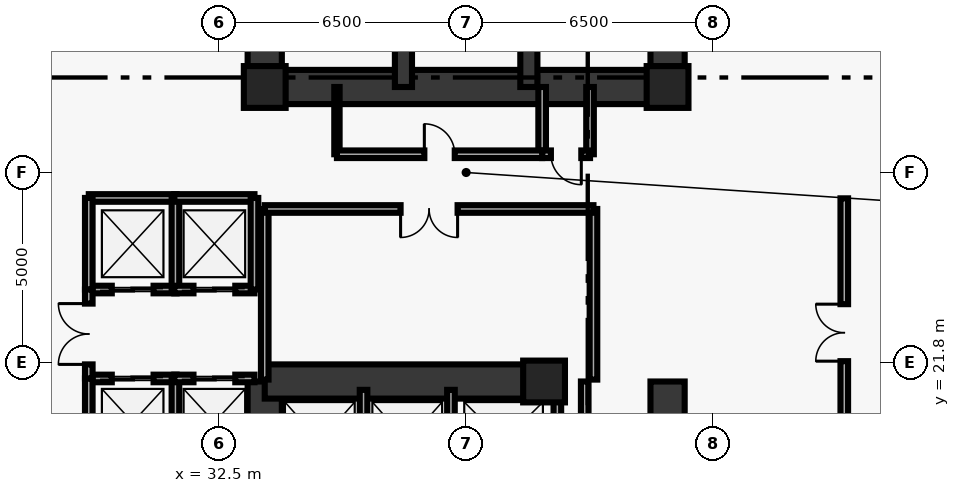
"""IFC4 building model, lengths in metres.
Left out: names, types, materials, properties, quantities, classifications, styles, units other than length and angle.
Written with IfcOpenShell. Run it as: python <this file> out.ifc"""

import sys

from ifc_helpers import new_model, si_unit, direction, frame, frame_2d, origin, origin_2d, place, context, subcontext, project, spatial, rectangle, extrude, element, fill, save


model = new_model("IFC4")
c1 = context("Model", 3, precision=1e-05, world=origin(), true_north=direction((0.0, 1.0)))
c2 = subcontext(c1, "Body", "Model", "MODEL_VIEW")
j1 = project(units=[si_unit("LENGTHUNIT", "METRE"), si_unit("PLANEANGLEUNIT", "RADIAN")], contexts=[c1])
p1 = place(None, origin())
s1 = spatial("IfcSite", under=j1, at=p1, CompositionType="ELEMENT")
p2 = place(p1, origin())
s2 = spatial("IfcBuilding", under=s1, at=p2, CompositionType="ELEMENT")
p3 = place(p2, frame((0.0, 0.0, -9.0)))
s3 = spatial("IfcBuildingStorey", under=s2, at=p3, CompositionType="ELEMENT", Elevation=-9.0)
for number, where, z_axis, x_axis in (
    (1, (41.05, 21.3, 0.0), (0.0, 0.0, 1.0), (1.0, 0.0, 0.0)),
    (2, (44.3, 29.05, 0.0), (0.0, 0.0, 1.0), (1.0, 0.0, 0.0)),
    (3, (33.7, 29.05, 0.0), (0.0, 0.0, 1.0), (1.0, 0.0, 0.0)),
):
    element("IfcColumn", number, at=place(p3, frame(where, z_axis=z_axis, x_axis=x_axis)), inside=s3, PredefinedType="PILASTER", context=c2, shape_type="SweptSolid", body=[
        extrude(rectangle(XDim=1.1, YDim=1.1, at=origin_2d()), origin(), (0.0, 0.0, 1.0), 4.2),
    ])
p4 = place(p3, frame((33.7, 29.05, 0.0), z_axis=(0.0, 0.0, 1.0), x_axis=(0.0, 1.0, 0.0)))
e4 = element("IfcWall", 4, at=p4, inside=s3, PredefinedType="SHEAR", context=c2, shape_type="SweptSolid", body=[
    extrude(rectangle(XDim=8.35, YDim=0.9, at=frame_2d((4.175, 0.0))), origin(), (0.0, 0.0, 1.0), 4.2),
])
p5 = place(p3, frame((33.7, 18.35, 0.0), z_axis=(0.0, 0.0, 1.0), x_axis=(0.0, 1.0, 0.0)))
e5 = element("IfcWall", 5, at=p5, inside=s3, PredefinedType="SHEAR", context=c2, shape_type="SweptSolid", body=[
    extrude(rectangle(XDim=2.95, YDim=0.9, at=frame_2d((1.475, 0.0))), origin(), (0.0, 0.0, 1.0), 4.2),
])
p6 = place(p3, frame((44.3, 29.05, 0.0), z_axis=(0.0, 0.0, 1.0), x_axis=(0.0, 1.0, 0.0)))
e6 = element("IfcWall", 6, at=p6, inside=s3, PredefinedType="SHEAR", context=c2, shape_type="SweptSolid", body=[
    extrude(rectangle(XDim=8.35, YDim=0.9, at=frame_2d((4.175, 0.0))), origin(), (0.0, 0.0, 1.0), 4.2),
])
p7 = place(p3, frame((44.3, 18.35, 0.0), z_axis=(0.0, 0.0, 1.0), x_axis=(0.0, 1.0, 0.0)))
e7 = element("IfcWall", 7, at=p7, inside=s3, PredefinedType="SHEAR", context=c2, shape_type="SweptSolid", body=[
    extrude(rectangle(XDim=2.95, YDim=0.9, at=frame_2d((1.475, 0.0))), origin(), (0.0, 0.0, 1.0), 4.2),
])
p8 = place(p3, frame((33.7, 29.05, 0.0), z_axis=(0.0, 0.0, 1.0), x_axis=(1.0, 0.0, 0.0)))
e8 = element("IfcWall", 8, at=p8, inside=s3, PredefinedType="SHEAR", context=c2, shape_type="SweptSolid", body=[
    extrude(rectangle(XDim=10.6, YDim=0.9, at=frame_2d((5.3, 0.0))), origin(), (0.0, 0.0, 1.0), 4.2),
])
p9 = place(p3, frame((33.7, 21.3, 0.0), z_axis=(0.0, 0.0, 1.0), x_axis=(1.0, 0.0, 0.0)))
e9 = element("IfcWall", 9, at=p9, inside=s3, PredefinedType="SHEAR", context=c2, shape_type="SweptSolid", body=[
    extrude(rectangle(XDim=7.55, YDim=0.9, at=frame_2d((3.775, 0.0))), origin(), (0.0, 0.0, 1.0), 4.2),
])
for number, where, z_axis, x_axis in (
    (10, (37.35, 29.05, 0.0), (0.0, 0.0, 1.0), (0.0, 1.0, 0.0)),
    (11, (40.65, 29.05, 0.0), (0.0, 0.0, 1.0), (0.0, 1.0, 0.0)),
):
    element("IfcWall", number, at=place(p3, frame(where, z_axis=z_axis, x_axis=x_axis)), inside=s3, PredefinedType="SHEAR", context=c2, shape_type="SweptSolid", body=[
        extrude(rectangle(XDim=8.35, YDim=0.45, at=frame_2d((4.175, 0.0))), origin(), (0.0, 0.0, 1.0), 4.2),
    ])
p10 = place(p3, frame((35.6, 27.28, 0.0), z_axis=(0.0, 0.0, 1.0), x_axis=(0.0, 1.0, 0.0)))
e12 = element("IfcWall", 12, at=p10, inside=s3, PredefinedType="PARTITIONING", context=c2, shape_type="SweptSolid", body=[
    extrude(rectangle(XDim=1.77, YDim=0.14, at=frame_2d((0.885, 0.0))), origin(), (0.0, 0.0, 1.0), 4.2),
])
for number, where, z_axis, x_axis in (
    (13, (41.0, 27.28, 0.0), (0.0, 0.0, 1.0), (0.0, 1.0, 0.0)),
    (14, (42.26, 27.28, 0.0), (0.0, 0.0, 1.0), (0.0, 1.0, 0.0)),
):
    element("IfcWall", number, at=place(p3, frame(where, z_axis=z_axis, x_axis=x_axis)), inside=s3, PredefinedType="SOLIDWALL", context=c2, shape_type="SweptSolid", body=[
        extrude(rectangle(XDim=1.77, YDim=0.2, at=frame_2d((0.885, 0.0))), origin(), (0.0, 0.0, 1.0), 4.2),
    ])
p11 = place(p3, frame((41.0, 27.28, 0.0), z_axis=(0.0, 0.0, 1.0), x_axis=(1.0, 0.0, 0.0)))
e15 = element("IfcWall", 15, at=p11, inside=s3, PredefinedType="SOLIDWALL", context=c2, shape_type="SweptSolid", body=[
    extrude(rectangle(XDim=1.26, YDim=0.2, at=frame_2d((0.63, 0.0))), origin(), (0.0, 0.0, 1.0), 4.2),
])
p12 = place(p11, frame((0.23, 0.0, 0.0)))
e16 = element("IfcOpeningElement", 16, at=p12, cuts=e15, PredefinedType="OPENING", context=c2, shape_type="SweptSolid", body=[
    extrude(rectangle(XDim=0.8, YDim=2.05, at=frame_2d((0.4, 1.025))), frame((0.0, 0.11, 0.0), z_axis=(0.0, -1.0, 0.0), x_axis=(1.0, 0.0, 0.0)), (0.0, 0.0, 1.0), 0.22),
])
p13 = place(p3, frame((29.07, 23.72, 0.0), z_axis=(0.0, 0.0, 1.0), x_axis=(1.0, 0.0, 0.0)))
e17 = element("IfcWall", 17, at=p13, inside=s3, PredefinedType="SOLIDWALL", context=c2, shape_type="SweptSolid", body=[
    extrude(rectangle(XDim=2.31, YDim=0.2, at=frame_2d((1.155, 0.0))), origin(), (0.0, 0.0, 1.0), 4.2),
])
p14 = place(p13, frame((0.605, 0.0, 0.0)))
e18 = element("IfcOpeningElement", 18, at=p14, cuts=e17, PredefinedType="OPENING", context=c2, shape_type="SweptSolid", body=[
    extrude(rectangle(XDim=1.1, YDim=2.15, at=frame_2d((0.55, 1.075))), frame((0.0, 0.11, 0.0), z_axis=(0.0, -1.0, 0.0), x_axis=(1.0, 0.0, 0.0)), (0.0, 0.0, 1.0), 0.22),
])
p15 = place(p3, frame((29.07, 26.13, 0.0), z_axis=(0.0, 0.0, 1.0), x_axis=(1.0, 0.0, 0.0)))
e19 = element("IfcWall", 19, at=p15, inside=s3, PredefinedType="SOLIDWALL", context=c2, shape_type="SweptSolid", body=[
    extrude(rectangle(XDim=2.31, YDim=0.2, at=frame_2d((1.155, 0.0))), origin(), (0.0, 0.0, 1.0), 4.2),
])
for number, where, z_axis, x_axis in (
    (20, (29.07, 23.72, 0.0), (0.0, 0.0, 1.0), (0.0, 1.0, 0.0)),
    (21, (31.35, 23.72, 0.0), (0.0, 0.0, 1.0), (0.0, 1.0, 0.0)),
):
    element("IfcWall", number, at=place(p3, frame(where, z_axis=z_axis, x_axis=x_axis)), inside=s3, PredefinedType="SOLIDWALL", context=c2, shape_type="SweptSolid", body=[
        extrude(rectangle(XDim=2.41, YDim=0.2, at=frame_2d((1.205, 0.0))), origin(), (0.0, 0.0, 1.0), 4.2),
    ])
p16 = place(p3, frame((31.32, 23.72, 0.0), z_axis=(0.0, 0.0, 1.0), x_axis=(1.0, 0.0, 0.0)))
e22 = element("IfcWall", 22, at=p16, inside=s3, PredefinedType="SOLIDWALL", context=c2, shape_type="SweptSolid", body=[
    extrude(rectangle(XDim=2.11, YDim=0.2, at=frame_2d((1.055, 0.0))), origin(), (0.0, 0.0, 1.0), 4.2),
])
p17 = place(p16, frame((0.505, 0.0, 0.0)))
e23 = element("IfcOpeningElement", 23, at=p17, cuts=e22, PredefinedType="OPENING", context=c2, shape_type="SweptSolid", body=[
    extrude(rectangle(XDim=1.1, YDim=2.15, at=frame_2d((0.55, 1.075))), frame((0.0, 0.11, 0.0), z_axis=(0.0, -1.0, 0.0), x_axis=(1.0, 0.0, 0.0)), (0.0, 0.0, 1.0), 0.22),
])
p18 = place(p3, frame((31.32, 26.13, 0.0), z_axis=(0.0, 0.0, 1.0), x_axis=(1.0, 0.0, 0.0)))
e24 = element("IfcWall", 24, at=p18, inside=s3, PredefinedType="SOLIDWALL", context=c2, shape_type="SweptSolid", body=[
    extrude(rectangle(XDim=2.11, YDim=0.2, at=frame_2d((1.055, 0.0))), origin(), (0.0, 0.0, 1.0), 4.2),
])
p19 = place(p3, frame((33.43, 23.72, 0.0), z_axis=(0.0, 0.0, 1.0), x_axis=(0.0, 1.0, 0.0)))
e25 = element("IfcWall", 25, at=p19, inside=s3, PredefinedType="SOLIDWALL", context=c2, shape_type="SweptSolid", body=[
    extrude(rectangle(XDim=2.41, YDim=0.2, at=frame_2d((1.205, 0.0))), origin(), (0.0, 0.0, 1.0), 4.2),
])
p20 = place(p3, frame((29.07, 21.38, 0.0), z_axis=(0.0, 0.0, 1.0), x_axis=(1.0, 0.0, 0.0)))
e26 = element("IfcWall", 26, at=p20, inside=s3, PredefinedType="SOLIDWALL", context=c2, shape_type="SweptSolid", body=[
    extrude(rectangle(XDim=2.31, YDim=0.2, at=frame_2d((1.155, 0.0))), origin(), (0.0, 0.0, 1.0), 4.2),
])
p21 = place(p20, frame((0.605, 0.0, 0.0)))
e27 = element("IfcOpeningElement", 27, at=p21, cuts=e26, PredefinedType="OPENING", context=c2, shape_type="SweptSolid", body=[
    extrude(rectangle(XDim=1.1, YDim=2.15, at=frame_2d((0.55, 1.075))), frame((0.0, 0.11, 0.0), z_axis=(0.0, -1.0, 0.0), x_axis=(1.0, 0.0, 0.0)), (0.0, 0.0, 1.0), 0.22),
])
for number, where, z_axis, x_axis in (
    (28, (29.07, 19.07, 0.0), (0.0, 0.0, 1.0), (0.0, 1.0, 0.0)),
    (29, (31.35, 19.07, 0.0), (0.0, 0.0, 1.0), (0.0, 1.0, 0.0)),
):
    element("IfcWall", number, at=place(p3, frame(where, z_axis=z_axis, x_axis=x_axis)), inside=s3, PredefinedType="SOLIDWALL", context=c2, shape_type="SweptSolid", body=[
        extrude(rectangle(XDim=2.31, YDim=0.2, at=frame_2d((1.155, 0.0))), origin(), (0.0, 0.0, 1.0), 4.2),
    ])
p22 = place(p3, frame((31.32, 21.38, 0.0), z_axis=(0.0, 0.0, 1.0), x_axis=(1.0, 0.0, 0.0)))
e30 = element("IfcWall", 30, at=p22, inside=s3, PredefinedType="SOLIDWALL", context=c2, shape_type="SweptSolid", body=[
    extrude(rectangle(XDim=2.11, YDim=0.2, at=frame_2d((1.055, 0.0))), origin(), (0.0, 0.0, 1.0), 4.2),
])
p23 = place(p22, frame((0.505, 0.0, 0.0)))
e31 = element("IfcOpeningElement", 31, at=p23, cuts=e30, PredefinedType="OPENING", context=c2, shape_type="SweptSolid", body=[
    extrude(rectangle(XDim=1.1, YDim=2.15, at=frame_2d((0.55, 1.075))), frame((0.0, 0.11, 0.0), z_axis=(0.0, -1.0, 0.0), x_axis=(1.0, 0.0, 0.0)), (0.0, 0.0, 1.0), 0.22),
])
for number, where, z_axis, x_axis in (
    (32, (36.3, 18.37, 0.0), (0.0, 0.0, 1.0), (0.0, 1.0, 0.0)),
    (33, (38.6, 18.37, 0.0), (0.0, 0.0, 1.0), (0.0, 1.0, 0.0)),
    (34, (41.4, 18.37, 0.0), (0.0, 0.0, 1.0), (0.0, 1.0, 0.0)),
):
    element("IfcWall", number, at=place(p3, frame(where, z_axis=z_axis, x_axis=x_axis)), inside=s3, PredefinedType="SOLIDWALL", context=c2, shape_type="SweptSolid", body=[
        extrude(rectangle(XDim=2.71, YDim=0.2, at=frame_2d((1.355, 0.0))), origin(), (0.0, 0.0, 1.0), 4.2),
    ])
p24 = place(p3, frame((29.07, 21.38, 0.0), z_axis=(0.0, 0.0, 1.0), x_axis=(0.0, 1.0, 0.0)))
e35 = element("IfcWall", 35, at=p24, inside=s3, PredefinedType="SOLIDWALL", context=c2, shape_type="SweptSolid", body=[
    extrude(rectangle(XDim=2.34, YDim=0.2, at=frame_2d((1.17, 0.0))), origin(), (0.0, 0.0, 1.0), 4.2),
])
p25 = place(p24, frame((0.37, 0.0, 0.0)))
e36 = element("IfcOpeningElement", 36, at=p25, cuts=e35, PredefinedType="OPENING", context=c2, shape_type="SweptSolid", body=[
    extrude(rectangle(XDim=1.6, YDim=2.2, at=frame_2d((0.8, 1.1))), frame((0.0, 0.11, 0.0), z_axis=(0.0, -1.0, 0.0), x_axis=(1.0, 0.0, 0.0)), (0.0, 0.0, 1.0), 0.22),
])
p26 = place(p3, frame((48.95, 19.05, 0.0), z_axis=(0.0, 0.0, 1.0), x_axis=(0.0, 1.0, 0.0)))
e37 = element("IfcWall", 37, at=p26, inside=s3, PredefinedType="SOLIDWALL", context=c2, shape_type="SweptSolid", body=[
    extrude(rectangle(XDim=7.07, YDim=0.2, at=frame_2d((3.535, 0.0))), origin(), (0.0, 0.0, 1.0), 4.2),
])
p27 = place(p26, frame((2.785, 0.0, 0.0)))
e38 = element("IfcOpeningElement", 38, at=p27, cuts=e37, PredefinedType="OPENING", context=c2, shape_type="SweptSolid", body=[
    extrude(rectangle(XDim=1.5, YDim=2.2, at=frame_2d((0.75, 1.1))), frame((0.0, 0.11, 0.0), z_axis=(0.0, -1.0, 0.0), x_axis=(1.0, 0.0, 0.0)), (0.0, 0.0, 1.0), 0.22),
])
for number, where, z_axis, x_axis in (
    (39, (33.7, 21.35, 0.0), (0.0, 0.0, 1.0), (0.0, 1.0, 0.0)),
    (40, (42.35, 21.35, 0.0), (0.0, 0.0, 1.0), (0.0, 1.0, 0.0)),
):
    element("IfcWall", number, at=place(p3, frame(where, z_axis=z_axis, x_axis=x_axis)), inside=s3, PredefinedType="SOLIDWALL", context=c2, shape_type="SweptSolid", body=[
        extrude(rectangle(XDim=4.49, YDim=0.2, at=frame_2d((2.245, 0.0))), origin(), (0.0, 0.0, 1.0), 4.2),
    ])
p28 = place(p3, frame((42.35, 25.84, 0.0), z_axis=(0.0, 0.0, 1.0), x_axis=(-1.0, 0.0, 0.0)))
e41 = element("IfcWall", 41, at=p28, inside=s3, PredefinedType="SOLIDWALL", context=c2, shape_type="SweptSolid", body=[
    extrude(rectangle(XDim=8.65, YDim=0.2, at=frame_2d((4.325, 0.0))), origin(), (0.0, 0.0, 1.0), 4.2),
])
p29 = place(p28, frame((3.575, 0.0, 0.0)))
e42 = element("IfcOpeningElement", 42, at=p29, cuts=e41, PredefinedType="OPENING", context=c2, shape_type="SweptSolid", body=[
    extrude(rectangle(XDim=1.5, YDim=2.2, at=frame_2d((0.75, 1.1))), frame((0.0, 0.11, 0.0), z_axis=(0.0, -1.0, 0.0), x_axis=(1.0, 0.0, 0.0)), (0.0, 0.0, 1.0), 0.22),
])
p30 = place(p3, frame((35.6, 27.28, 0.0), z_axis=(0.0, 0.0, 1.0), x_axis=(1.0, 0.0, 0.0)))
e43 = element("IfcWall", 43, at=p30, inside=s3, PredefinedType="SOLIDWALL", context=c2, shape_type="SweptSolid", body=[
    extrude(rectangle(XDim=5.4, YDim=0.2, at=frame_2d((2.7, 0.0))), origin(), (0.0, 0.0, 1.0), 4.2),
])
p31 = place(p30, frame((2.3, 0.0, 0.0)))
e44 = element("IfcOpeningElement", 44, at=p31, cuts=e43, PredefinedType="OPENING", context=c2, shape_type="SweptSolid", body=[
    extrude(rectangle(XDim=0.8, YDim=2.05, at=frame_2d((0.4, 1.025))), frame((0.0, 0.11, 0.0), z_axis=(0.0, -1.0, 0.0), x_axis=(1.0, 0.0, 0.0)), (0.0, 0.0, 1.0), 0.22),
])
p32 = place(p3, frame((42.12, 18.35, 0.0), z_axis=(0.0, 0.0, 1.0), x_axis=(0.0, 1.0, 0.0)))
e45 = element("IfcWall", 45, at=p32, inside=s3, PredefinedType="SOLIDWALL", context=c2, shape_type="SweptSolid", body=[
    extrude(rectangle(XDim=2.95, YDim=0.2, at=frame_2d((1.475, 0.0))), origin(), (0.0, 0.0, 1.0), 4.2),
])
p33 = place(p32, frame((0.2, 0.0, 0.0)))
e46 = element("IfcOpeningElement", 46, at=p33, cuts=e45, PredefinedType="OPENING", context=c2, shape_type="SweptSolid", body=[
    extrude(rectangle(XDim=0.8, YDim=2.05, at=frame_2d((0.4, 1.025))), frame((0.0, 0.11, 0.0), z_axis=(0.0, -1.0, 0.0), x_axis=(1.0, 0.0, 0.0)), (0.0, 0.0, 1.0), 0.22),
])
p34 = place(p12, origin())
e47 = element("IfcDoor", 47, at=p34, inside=s3, OperationType="SINGLE_SWING_RIGHT", PredefinedType="DOOR", context=c2, shape_type="SweptSolid", body=[
    extrude(rectangle(XDim=0.8, YDim=2.05, at=frame_2d((0.4, 1.025))), frame((0.0, 0.025, 0.0), z_axis=(0.0, -1.0, 0.0), x_axis=(1.0, 0.0, 0.0)), (0.0, 0.0, 1.0), 0.05),
])
fill(e16, e47)
p35 = place(p14, origin())
e48 = element("IfcDoor", 48, at=p35, inside=s3, OperationType="DOUBLE_DOOR_SLIDING", PredefinedType="DOOR", context=c2, shape_type="SweptSolid", body=[
    extrude(rectangle(XDim=1.1, YDim=2.15, at=frame_2d((0.55, 1.075))), frame((0.0, 0.025, 0.0), z_axis=(0.0, -1.0, 0.0), x_axis=(1.0, 0.0, 0.0)), (0.0, 0.0, 1.0), 0.05),
])
fill(e18, e48)
p36 = place(p17, origin())
e49 = element("IfcDoor", 49, at=p36, inside=s3, OperationType="DOUBLE_DOOR_SLIDING", PredefinedType="DOOR", context=c2, shape_type="SweptSolid", body=[
    extrude(rectangle(XDim=1.1, YDim=2.15, at=frame_2d((0.55, 1.075))), frame((0.0, 0.025, 0.0), z_axis=(0.0, -1.0, 0.0), x_axis=(1.0, 0.0, 0.0)), (0.0, 0.0, 1.0), 0.05),
])
fill(e23, e49)
p37 = place(p21, origin())
e50 = element("IfcDoor", 50, at=p37, inside=s3, OperationType="DOUBLE_DOOR_SLIDING", PredefinedType="DOOR", context=c2, shape_type="SweptSolid", body=[
    extrude(rectangle(XDim=1.1, YDim=2.15, at=frame_2d((0.55, 1.075))), frame((0.0, 0.025, 0.0), z_axis=(0.0, -1.0, 0.0), x_axis=(1.0, 0.0, 0.0)), (0.0, 0.0, 1.0), 0.05),
])
fill(e27, e50)
p38 = place(p23, origin())
e51 = element("IfcDoor", 51, at=p38, inside=s3, OperationType="DOUBLE_DOOR_SLIDING", PredefinedType="DOOR", context=c2, shape_type="SweptSolid", body=[
    extrude(rectangle(XDim=1.1, YDim=2.15, at=frame_2d((0.55, 1.075))), frame((0.0, 0.025, 0.0), z_axis=(0.0, -1.0, 0.0), x_axis=(1.0, 0.0, 0.0)), (0.0, 0.0, 1.0), 0.05),
])
fill(e31, e51)
p39 = place(p25, origin())
e52 = element("IfcDoor", 52, at=p39, inside=s3, OperationType="DOUBLE_DOOR_SINGLE_SWING", PredefinedType="DOOR", context=c2, shape_type="SweptSolid", body=[
    extrude(rectangle(XDim=1.6, YDim=2.2, at=frame_2d((0.8, 1.1))), frame((0.0, 0.025, 0.0), z_axis=(0.0, -1.0, 0.0), x_axis=(1.0, 0.0, 0.0)), (0.0, 0.0, 1.0), 0.05),
])
fill(e36, e52)
p40 = place(p27, origin())
e53 = element("IfcDoor", 53, at=p40, inside=s3, OperationType="DOUBLE_DOOR_SINGLE_SWING", PredefinedType="DOOR", context=c2, shape_type="SweptSolid", body=[
    extrude(rectangle(XDim=1.5, YDim=2.2, at=frame_2d((0.75, 1.1))), frame((0.0, 0.025, 0.0), z_axis=(0.0, -1.0, 0.0), x_axis=(1.0, 0.0, 0.0)), (0.0, 0.0, 1.0), 0.05),
])
fill(e38, e53)
p41 = place(p29, origin())
e54 = element("IfcDoor", 54, at=p41, inside=s3, OperationType="DOUBLE_DOOR_SINGLE_SWING", PredefinedType="DOOR", context=c2, shape_type="SweptSolid", body=[
    extrude(rectangle(XDim=1.5, YDim=2.2, at=frame_2d((0.75, 1.1))), frame((0.0, 0.025, 0.0), z_axis=(0.0, -1.0, 0.0), x_axis=(1.0, 0.0, 0.0)), (0.0, 0.0, 1.0), 0.05),
])
fill(e42, e54)
p42 = place(p31, origin())
e55 = element("IfcDoor", 55, at=p42, inside=s3, OperationType="SINGLE_SWING_LEFT", PredefinedType="DOOR", context=c2, shape_type="SweptSolid", body=[
    extrude(rectangle(XDim=0.8, YDim=2.05, at=frame_2d((0.4, 1.025))), frame((0.0, 0.025, 0.0), z_axis=(0.0, -1.0, 0.0), x_axis=(1.0, 0.0, 0.0)), (0.0, 0.0, 1.0), 0.05),
])
fill(e44, e55)
save(model, sys.argv[1])
